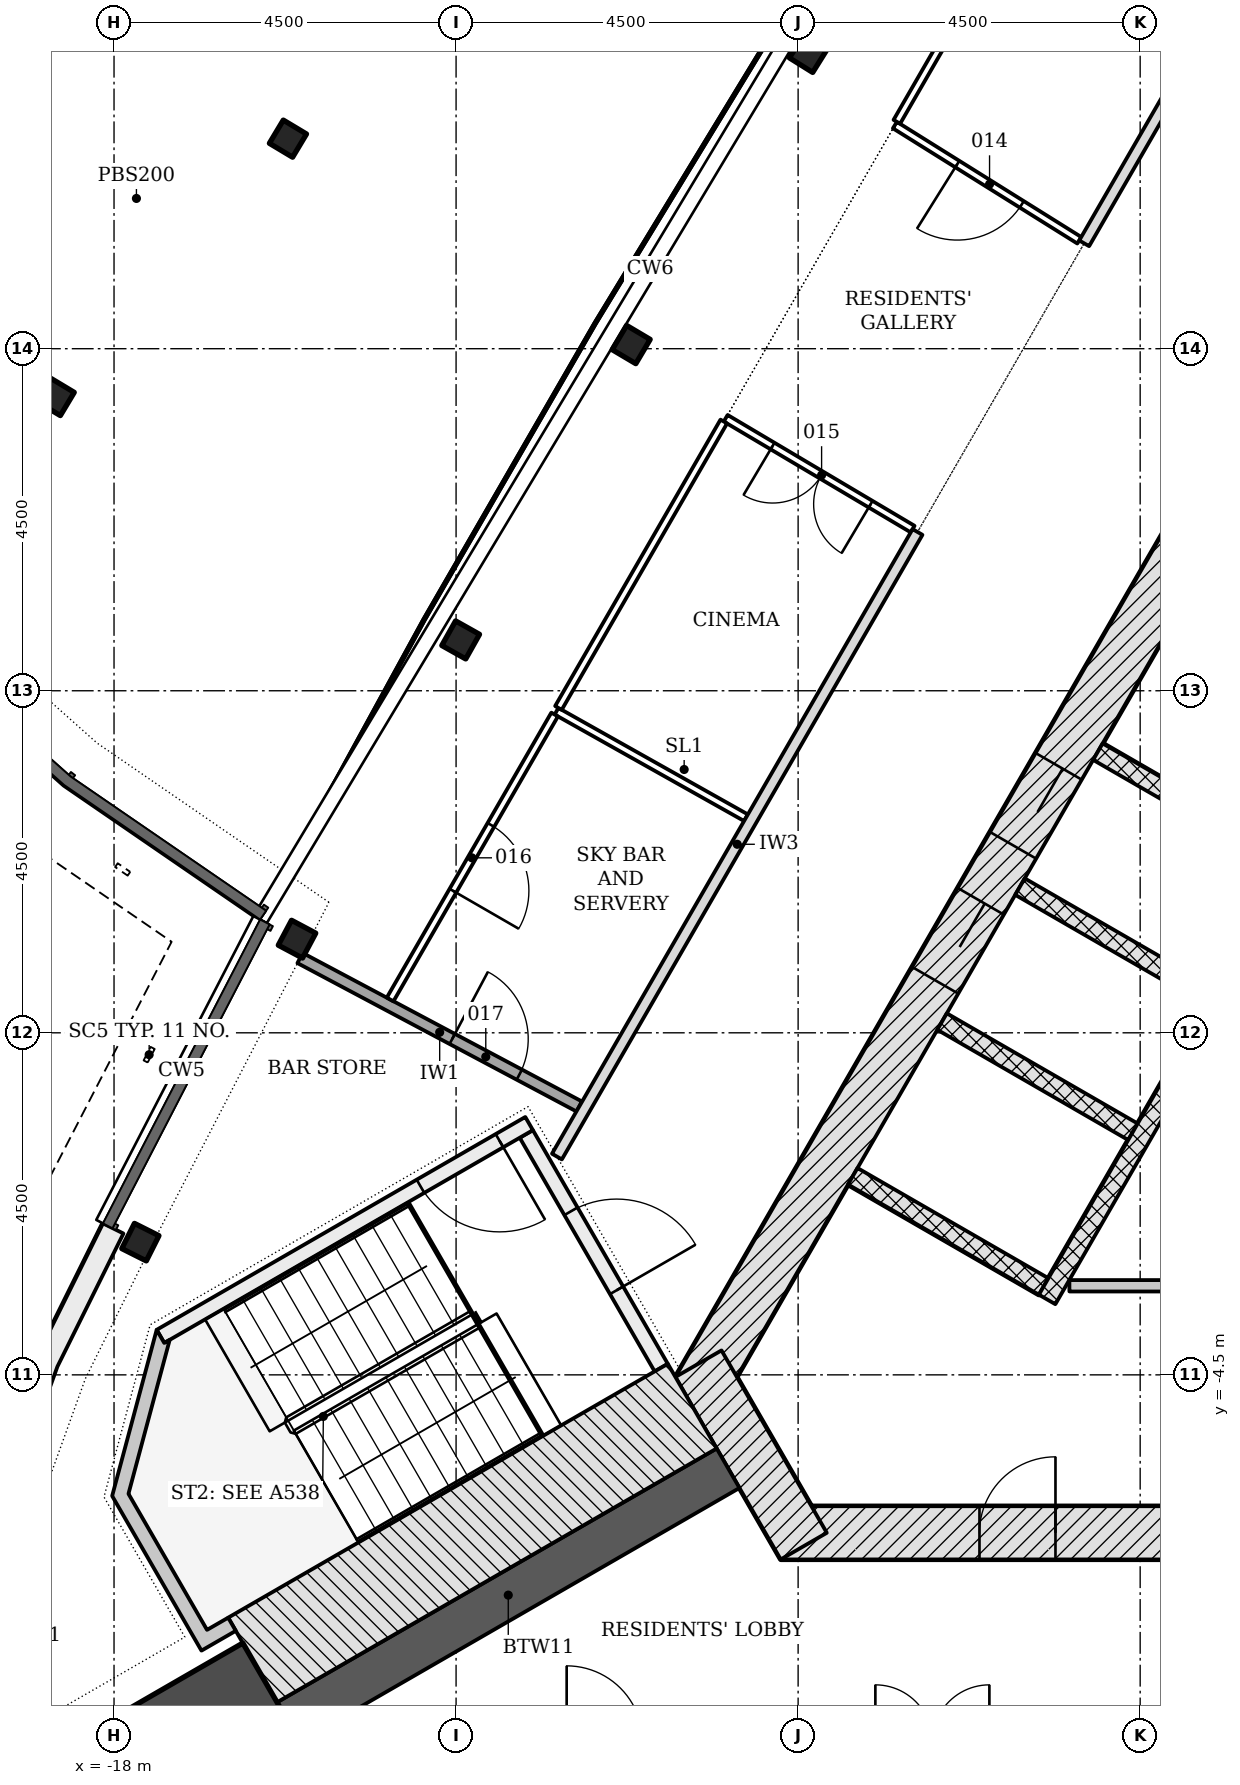
"""IFC4 building model, lengths in metres.
Left out: names, types, materials, properties, quantities, classifications, styles, units other than length and angle.
Written with IfcOpenShell. Run it as: python <this file> out.ifc"""

import sys

from ifc_helpers import new_model, si_unit, direction, frame, frame_2d, origin, origin_2d, place, context, subcontext, project, spatial, polyline, rectangle, hollow_rectangle, i_section, outline, extrude, element, fill, save


model = new_model("IFC4")
c1 = context("Model", 3, precision=1e-05, world=origin(), true_north=direction((0.0, 1.0)))
c2 = subcontext(c1, "Body", "Model", "MODEL_VIEW")
j1 = project(units=[si_unit("LENGTHUNIT", "METRE"), si_unit("PLANEANGLEUNIT", "RADIAN")], contexts=[c1])
p1 = place(None, origin())
s1 = spatial("IfcSite", under=j1, at=p1, CompositionType="ELEMENT")
p2 = place(p1, origin())
s2 = spatial("IfcBuilding", under=s1, at=p2, CompositionType="ELEMENT")
p3 = place(p2, frame((0.0, 0.0, 263.4)))
s3 = spatial("IfcBuildingStorey", under=s2, at=p3, CompositionType="ELEMENT", Elevation=263.4)
p4 = place(p3, frame((-9.229, -6.578, -0.2), z_axis=(0.0, 0.0, 1.0), x_axis=(1.0, 0.0, 0.0)))
e1 = element("IfcWall", 1, at=p4, inside=s3, PredefinedType="SHEAR", context=c2, shape_type="SweptSolid", body=[
    extrude(rectangle(XDim=18.458, YDim=0.7, at=frame_2d((9.229, 0.0))), origin(), (0.0, 0.0, 1.0), 3.6),
])
p5 = place(p4, frame((6.1, 0.0, 0.2)))
e2 = element("IfcOpeningElement", 2, at=p5, cuts=e1, PredefinedType="OPENING", context=c2, shape_type="SweptSolid", body=[
    extrude(rectangle(XDim=1.0, YDim=2.1, at=frame_2d((0.5, 1.05))), frame((0.0, 0.36, 0.0), z_axis=(0.0, -1.0, 0.0), x_axis=(1.0, 0.0, 0.0)), (0.0, 0.0, 1.0), 0.72),
])
p6 = place(p4, frame((2.615, 0.0, 0.2)))
e3 = element("IfcOpeningElement", 3, at=p6, cuts=e1, PredefinedType="OPENING", context=c2, shape_type="SweptSolid", body=[
    extrude(rectangle(XDim=1.0, YDim=2.1, at=frame_2d((0.5, 1.05))), frame((0.0, 0.36, 0.0), z_axis=(0.0, -1.0, 0.0), x_axis=(1.0, 0.0, 0.0)), (0.0, 0.0, 1.0), 0.72),
])
p7 = place(p4, frame((9.198, 0.0, 0.2)))
e4 = element("IfcOpeningElement", 4, at=p7, cuts=e1, PredefinedType="OPENING", context=c2, shape_type="SweptSolid", body=[
    extrude(rectangle(XDim=0.9, YDim=2.1, at=frame_2d((0.45, 1.05))), frame((0.0, 0.36, 0.0), z_axis=(0.0, -1.0, 0.0), x_axis=(1.0, 0.0, 0.0)), (0.0, 0.0, 1.0), 0.72),
])
p8 = place(p4, frame((13.877, 0.0, 0.2)))
e5 = element("IfcOpeningElement", 5, at=p8, cuts=e1, PredefinedType="OPENING", context=c2, shape_type="SweptSolid", body=[
    extrude(rectangle(XDim=0.9, YDim=2.1, at=frame_2d((0.45, 1.05))), frame((0.0, 0.36, 0.0), z_axis=(0.0, -1.0, 0.0), x_axis=(1.0, 0.0, 0.0)), (0.0, 0.0, 1.0), 0.72),
])
p9 = place(p3, frame((-1.083, 11.281, -0.2), z_axis=(0.0, 0.0, 1.0), x_axis=(-0.500001446645, -0.866024568562, 0.0)))
e6 = element("IfcWall", 6, at=p9, inside=s3, PredefinedType="SHEAR", context=c2, shape_type="SweptSolid", body=[
    extrude(rectangle(XDim=18.458, YDim=0.7, at=frame_2d((9.229, 0.0))), origin(), (0.0, 0.0, 1.0), 3.6),
])
p10 = place(p9, frame((8.979, 0.0, 0.2)))
e7 = element("IfcOpeningElement", 7, at=p10, cuts=e6, PredefinedType="OPENING", context=c2, shape_type="SweptSolid", body=[
    extrude(rectangle(XDim=1.2, YDim=2.1, at=frame_2d((0.6, 1.05))), frame((0.0, 0.36, 0.0), z_axis=(0.0, -1.0, 0.0), x_axis=(1.0, 0.0, 0.0)), (0.0, 0.0, 1.0), 0.72),
])
p11 = place(p9, frame((11.029, 0.0, 0.2)))
e8 = element("IfcOpeningElement", 8, at=p11, cuts=e6, PredefinedType="OPENING", context=c2, shape_type="SweptSolid", body=[
    extrude(rectangle(XDim=1.2, YDim=2.1, at=frame_2d((0.6, 1.05))), frame((0.0, 0.36, 0.0), z_axis=(0.0, -1.0, 0.0), x_axis=(1.0, 0.0, 0.0)), (0.0, 0.0, 1.0), 0.72),
])
p12 = place(p3, frame((-10.311, -4.353, -0.2), z_axis=(0.0, 0.0, 1.0), x_axis=(0.500042739161, -0.866000726912, 0.0)))
e9 = element("IfcWall", 9, at=p12, inside=s3, PredefinedType="SHEAR", context=c2, shape_type="SweptSolid", body=[
    extrude(rectangle(XDim=2.771, YDim=0.7, at=frame_2d((1.386, 0.0))), origin(), (0.0, 0.0, 1.0), 3.6),
])
p13 = place(p3, frame((-9.922, -5.728, -0.2), z_axis=(0.0, 0.0, 1.0), x_axis=(-0.866032176823, -0.499988268569, 0.0)))
e10 = element("IfcWall", 10, at=p13, inside=s3, PredefinedType="SHEAR", context=c2, shape_type="SweptSolid", body=[
    extrude(rectangle(XDim=6.678, YDim=0.6, at=frame_2d((3.339, 0.0))), origin(), (0.0, 0.0, 1.0), 3.6),
])
p14 = place(p3, frame((-16.745, -9.667, -0.2), z_axis=(0.0, 0.0, 1.0), x_axis=(-0.866025403784, -0.5, 0.0)))
e11 = element("IfcColumn", 11, at=p14, inside=s3, PredefinedType="COLUMN", context=c2, shape_type="SweptSolid", body=[
    extrude(rectangle(XDim=2.4, YDim=2.4, at=origin_2d()), origin(), (0.0, 0.0, 1.0), 3.6),
])
for number, where, z_axis, x_axis in (
    (12, (-8.863, 12.888, -0.2), (0.0, 0.0, 1.0), (-0.53, -0.848, 0.0)),
    (13, (-11.196, 9.055, -0.2), (0.0, 0.0, 1.0), (-0.51, -0.86, 0.0)),
    (14, (-13.44, 5.169, -0.2), (0.0, 0.0, 1.0), (-0.49, -0.872, 0.0)),
    (15, (-15.593, 1.232, -0.2), (0.0, 0.0, 1.0), (-0.47, -0.883, 0.0)),
    (16, (-17.654, -2.754, -0.2), (0.0, 0.0, 1.0), (-0.449, -0.894, 0.0)),
):
    element("IfcColumn", number, at=place(p3, frame(where, z_axis=z_axis, x_axis=x_axis)), inside=s3, PredefinedType="COLUMN", context=c2, shape_type="SweptSolid", body=[
        extrude(i_section(OverallWidth=0.371, OverallDepth=0.361, WebThickness=0.012, FlangeThickness=0.02, FilletRadius=0.015, at=origin_2d()), origin(), (0.0, 0.0, 1.0), 3.6),
    ])
for number, where, z_axis, x_axis in (
    (17, (-15.712, 11.763, -0.2), (0.0, 0.0, 1.0), (-0.858, 0.514, 0.0)),
    (18, (-18.768, 8.365, -0.2), (0.0, 0.0, 1.0), (-0.858, 0.514, 0.0)),
):
    element("IfcColumn", number, at=place(p3, frame(where, z_axis=z_axis, x_axis=x_axis)), inside=s3, PredefinedType="COLUMN", context=c2, shape_type="SweptSolid", body=[
        extrude(hollow_rectangle(XDim=0.356, YDim=0.356, WallThickness=0.013, at=origin_2d()), origin(), (0.0, 0.0, 1.0), 3.6),
    ])
p15 = place(p3, origin())
e19 = element("IfcWall", 19, at=p15, inside=s3, PredefinedType="NOTDEFINED", context=c2, shape_type="SweptSolid", body=[
    extrude(outline(polyline([(-18.145, -2.507), (-19.021, -4.273), (-19.538, -5.703), (-19.733, -7.21), (-19.599, -8.724), (-19.141, -10.174), (-18.381, -11.49), (-17.355, -12.611), (-16.111, -13.485), (-14.708, -14.069), (-13.211, -14.336), (-11.244, -14.46), (-11.225, -14.161), (-13.176, -14.038), (-14.623, -13.779), (-15.965, -13.22), (-17.156, -12.385), (-18.138, -11.312), (-18.865, -10.052), (-19.303, -8.665), (-19.432, -7.216), (-19.244, -5.774), (-18.745, -4.391), (-17.876, -2.64), (-18.145, -2.507)])), origin(), (0.0, 0.0, 1.0), 3.3),
])
for number, where, z_axis, x_axis in (
    (20, (-5.056, 3.699, -0.2), (0.0, 0.0, 1.0), (0.866, -0.5, 0.0)),
    (21, (-6.081, 1.923, -0.2), (0.0, 0.0, 1.0), (0.866, -0.5, 0.0)),
    (22, (-7.106, 0.148, -0.2), (0.0, 0.0, 1.0), (0.866, -0.5, 0.0)),
    (23, (-8.281, -1.887, -0.2), (0.0, 0.0, 1.0), (0.866, -0.5, 0.0)),
):
    element("IfcWall", number, at=place(p3, frame(where, z_axis=z_axis, x_axis=x_axis)), inside=s3, PredefinedType="PARTITIONING", context=c2, shape_type="SweptSolid", body=[
        extrude(rectangle(XDim=2.9, YDim=0.25, at=frame_2d((1.45, 0.0))), origin(), (0.0, 0.0, 1.0), 3.6),
    ])
p16 = place(p3, frame((-2.374, 2.294, 0.0), z_axis=(0.0, 0.0, 1.0), x_axis=(-0.500003174267, -0.866023571113, 0.0)))
e24 = element("IfcWall", 24, at=p16, inside=s3, PredefinedType="PARTITIONING", context=c2, shape_type="SweptSolid", body=[
    extrude(rectangle(XDim=6.7, YDim=0.25, at=frame_2d((3.35, 0.0))), origin(), (0.0, 0.0, 1.0), 3.4),
])
p17 = place(p3, frame((-5.431, -3.328, 0.0), z_axis=(0.0, 0.0, 1.0), x_axis=(1.0, 0.0, 0.0)))
e25 = element("IfcWall", 25, at=p17, inside=s3, PredefinedType="PARTITIONING", context=c2, shape_type="SweptSolid", body=[
    extrude(rectangle(XDim=1.952, YDim=0.15, at=frame_2d((0.976, 0.0))), origin(), (0.0, 0.0, 1.0), 3.4),
])
p18 = place(p3, frame((-12.576, -1.331, -0.2), z_axis=(0.0, 0.0, 1.0), x_axis=(0.499970499736, -0.8660424351, 0.0)))
e26 = element("IfcWall", 26, at=p18, inside=s3, PredefinedType="SHEAR", context=c2, shape_type="SweptSolid", body=[
    extrude(rectangle(XDim=3.55, YDim=0.2, at=frame_2d((1.775, 0.0))), origin(), (0.0, 0.0, 1.0), 3.6),
])
p19 = place(p18, frame((1.175, 0.0, 0.2)))
e27 = element("IfcOpeningElement", 27, at=p19, cuts=e26, PredefinedType="OPENING", context=c2, shape_type="SweptSolid", body=[
    extrude(rectangle(XDim=1.2, YDim=2.1, at=frame_2d((0.6, 1.05))), frame((0.0, 0.11, 0.0), z_axis=(0.0, -1.0, 0.0), x_axis=(1.0, 0.0, 0.0)), (0.0, 0.0, 1.0), 0.22),
])
p20 = place(p3, frame((-12.539, -1.194, -0.2), z_axis=(0.0, 0.0, 1.0), x_axis=(-0.866045472092, -0.499965239061, 0.0)))
e28 = element("IfcWall", 28, at=p20, inside=s3, PredefinedType="SHEAR", context=c2, shape_type="SweptSolid", body=[
    extrude(rectangle(XDim=5.6, YDim=0.2, at=frame_2d((2.8, 0.0))), origin(), (0.0, 0.0, 1.0), 3.6),
])
p21 = place(p20, frame((0.45, 0.0, 0.2)))
e29 = element("IfcOpeningElement", 29, at=p21, cuts=e28, PredefinedType="OPENING", context=c2, shape_type="SweptSolid", body=[
    extrude(rectangle(XDim=1.2, YDim=2.1, at=frame_2d((0.6, 1.05))), frame((0.0, 0.11, 0.0), z_axis=(0.0, -1.0, 0.0), x_axis=(1.0, 0.0, 0.0)), (0.0, 0.0, 1.0), 0.22),
])
p22 = place(p3, frame((-10.393, -4.912, -0.2), z_axis=(0.0, 0.0, 1.0), x_axis=(-0.866025486527, -0.499999856685, 0.0)))
e30 = element("IfcWall", 30, at=p22, inside=s3, PredefinedType="SHEAR", context=c2, shape_type="SweptSolid", body=[
    extrude(rectangle(XDim=6.679, YDim=1.286, at=frame_2d((3.339, 0.0))), origin(), (0.0, 0.0, 1.0), 3.6),
])
p23 = place(p3, frame((0.0, 0.0, -0.2)))
e31 = element("IfcWall", 31, at=p23, inside=s3, PredefinedType="SHEAR", context=c2, shape_type="SweptSolid", body=[
    extrude(outline(polyline([(-17.439, -3.907), (-18.025, -6.093), (-16.85, -8.128), (-16.398, -7.867), (-16.498, -7.694), (-16.498, -7.694), (-16.777, -7.855), (-17.81, -6.065), (-17.267, -4.039), (-17.339, -4.081), (-17.339, -4.081), (-17.339, -4.081), (-17.339, -4.081), (-17.339, -4.081), (-17.339, -4.081), (-17.339, -4.081), (-17.339, -4.081), (-17.339, -4.081), (-17.339, -4.081), (-17.339, -4.081), (-17.339, -4.081), (-17.339, -4.081), (-17.339, -4.081), (-17.339, -4.081), (-17.339, -4.081), (-17.339, -4.081), (-17.439, -3.907)])), origin(), (0.0, 0.0, 1.0), 3.6),
])
p24 = place(p3, frame((-0.723, 18.205, 0.0), z_axis=(0.0, 0.0, 1.0), x_axis=(-0.500010391421, -0.866019404212, 0.0)))
e32 = element("IfcWall", 32, at=p24, inside=s3, PredefinedType="PARTITIONING", context=c2, shape_type="SweptSolid", body=[
    extrude(rectangle(XDim=9.028, YDim=0.15, at=frame_2d((4.514, 0.0))), origin(), (0.0, 0.0, 1.0), 2.852),
])
p25 = place(p3, frame((-7.429, 6.589, 0.0), z_axis=(0.0, 0.0, 1.0), x_axis=(-0.499994197604, -0.866028753773, 0.0)))
e33 = element("IfcWall", 33, at=p25, inside=s3, PredefinedType="PARTITIONING", context=c2, shape_type="SweptSolid", body=[
    extrude(rectangle(XDim=9.488, YDim=0.15, at=frame_2d((4.744, 0.0))), origin(), (0.0, 0.0, 1.0), 2.852),
])
p26 = place(p3, frame((-15.552, 0.984, 0.0), z_axis=(0.0, 0.0, 1.0), x_axis=(0.882898276856, -0.469564300947, 0.0)))
e34 = element("IfcWall", 34, at=p26, inside=s3, PredefinedType="PARTITIONING", context=c2, shape_type="SweptSolid", body=[
    extrude(rectangle(XDim=4.159, YDim=0.15, at=frame_2d((2.08, 0.0))), origin(), (0.0, 0.0, 1.0), 3.4),
])
p27 = place(p26, frame((2.267, 0.0, 0.0)))
e35 = element("IfcOpeningElement", 35, at=p27, cuts=e34, PredefinedType="OPENING", context=c2, shape_type="SweptSolid", body=[
    extrude(rectangle(XDim=1.0, YDim=2.1, at=frame_2d((0.5, 1.05))), frame((0.0, 0.085, 0.0), z_axis=(0.0, -1.0, 0.0), x_axis=(1.0, 0.0, 0.0)), (0.0, 0.0, 1.0), 0.17),
])
p28 = place(p3, frame((-5.3, 10.426, 0.0), z_axis=(0.0, 0.0, 1.0), x_axis=(-0.84806062783, 0.529899208835, 0.0)))
e36 = element("IfcWall", 36, at=p28, inside=s3, PredefinedType="PARTITIONING", context=c2, shape_type="SweptSolid", body=[
    extrude(rectangle(XDim=2.861, YDim=0.1, at=frame_2d((1.43, 0.0))), origin(), (0.0, 0.0, 1.0), 3.4),
])
p29 = place(p28, frame((0.893, 0.0, 0.0)))
e37 = element("IfcOpeningElement", 37, at=p29, cuts=e36, PredefinedType="OPENING", context=c2, shape_type="SweptSolid", body=[
    extrude(rectangle(XDim=1.0, YDim=2.1, at=frame_2d((0.5, 1.05))), frame((0.0, 0.06, 0.0), z_axis=(0.0, -1.0, 0.0), x_axis=(1.0, 0.0, 0.0)), (0.0, 0.0, 1.0), 0.12),
])
p30 = place(p3, frame((-7.494, 6.627, 0.0), z_axis=(0.0, 0.0, 1.0), x_axis=(-0.860170843297, 0.510006000299, 0.0)))
e38 = element("IfcWall", 38, at=p30, inside=s3, PredefinedType="PARTITIONING", context=c2, shape_type="SweptSolid", body=[
    extrude(rectangle(XDim=2.859, YDim=0.1, at=frame_2d((1.43, 0.0))), origin(), (0.0, 0.0, 1.0), 3.4),
])
p31 = place(p30, frame((0.642, 0.0, 0.0)))
e39 = element("IfcOpeningElement", 39, at=p31, cuts=e38, PredefinedType="OPENING", context=c2, shape_type="SweptSolid", body=[
    extrude(rectangle(XDim=1.5, YDim=2.1, at=frame_2d((0.75, 1.05))), frame((0.0, 0.06, 0.0), z_axis=(0.0, -1.0, 0.0), x_axis=(1.0, 0.0, 0.0)), (0.0, 0.0, 1.0), 0.12),
])
p32 = place(p3, frame((-9.686, 2.83, 0.0), z_axis=(0.0, 0.0, 1.0), x_axis=(-0.871778429479, 0.489900367315, 0.0)))
e40 = element("IfcWall", 40, at=p32, inside=s3, PredefinedType="PARTITIONING", context=c2, shape_type="SweptSolid", body=[
    extrude(rectangle(XDim=2.859, YDim=0.1, at=frame_2d((1.43, 0.0))), origin(), (0.0, 0.0, 1.0), 3.4),
])
p33 = place(p3, frame((-2.586, 20.846, 0.0), z_axis=(0.0, 0.0, 1.0), x_axis=(-0.499993724355, -0.866029026999, 0.0)))
e41 = element("IfcWall", 41, at=p33, inside=s3, PredefinedType="PARTITIONING", context=c2, shape_type="SweptSolid", body=[
    extrude(rectangle(XDim=10.232, YDim=0.1, at=frame_2d((5.116, 0.0))), origin(), (0.0, 0.0, 1.0), 2.852),
])
p34 = place(p3, frame((-9.978, 8.042, 0.0), z_axis=(0.0, 0.0, 1.0), x_axis=(-0.500007404367, -0.866021128829, 0.0)))
e42 = element("IfcWall", 42, at=p34, inside=s3, PredefinedType="PARTITIONING", context=c2, shape_type="SweptSolid", body=[
    extrude(rectangle(XDim=4.351, YDim=0.1, at=frame_2d((2.176, 0.0))), origin(), (0.0, 0.0, 1.0), 2.852),
])
p35 = place(p3, frame((-12.204, 4.187, 0.0), z_axis=(0.0, 0.0, 1.0), x_axis=(-0.499973093216, -0.866040937866, 0.0)))
e43 = element("IfcWall", 43, at=p35, inside=s3, PredefinedType="PARTITIONING", context=c2, shape_type="SweptSolid", body=[
    extrude(rectangle(XDim=4.328, YDim=0.1, at=frame_2d((2.164, 0.0))), origin(), (0.0, 0.0, 1.0), 2.852),
])
p36 = place(p35, frame((1.677, 0.0, 0.0)))
e44 = element("IfcOpeningElement", 44, at=p36, cuts=e43, PredefinedType="OPENING", context=c2, shape_type="SweptSolid", body=[
    extrude(rectangle(XDim=1.0, YDim=2.1, at=frame_2d((0.5, 1.05))), frame((0.0, 0.06, 0.0), z_axis=(0.0, -1.0, 0.0), x_axis=(1.0, 0.0, 0.0)), (0.0, 0.0, 1.0), 0.12),
])
p37 = place(p10, origin())
e45 = element("IfcDoor", 45, at=p37, inside=s3, OperationType="DOUBLE_DOOR_SLIDING", PredefinedType="DOOR", context=c2, shape_type="SweptSolid", body=[
    extrude(rectangle(XDim=1.2, YDim=2.1, at=frame_2d((0.6, 1.05))), frame((0.0, 0.025, 0.0), z_axis=(0.0, -1.0, 0.0), x_axis=(1.0, 0.0, 0.0)), (0.0, 0.0, 1.0), 0.05),
])
fill(e7, e45)
p38 = place(p11, origin())
e46 = element("IfcDoor", 46, at=p38, inside=s3, OperationType="DOUBLE_DOOR_SLIDING", PredefinedType="DOOR", context=c2, shape_type="SweptSolid", body=[
    extrude(rectangle(XDim=1.2, YDim=2.1, at=frame_2d((0.6, 1.05))), frame((0.0, 0.025, 0.0), z_axis=(0.0, -1.0, 0.0), x_axis=(1.0, 0.0, 0.0)), (0.0, 0.0, 1.0), 0.05),
])
fill(e8, e46)
p39 = place(p6, origin())
e47 = element("IfcDoor", 47, at=p39, inside=s3, OperationType="SINGLE_SWING_RIGHT", PredefinedType="DOOR", context=c2, shape_type="SweptSolid", body=[
    extrude(rectangle(XDim=1.0, YDim=2.1, at=frame_2d((0.5, 1.05))), frame((0.0, 0.075, 0.0), z_axis=(0.0, -1.0, 0.0), x_axis=(1.0, 0.0, 0.0)), (0.0, 0.0, 1.0), 0.15),
])
fill(e3, e47)
p40 = place(p19, origin())
e48 = element("IfcDoor", 48, at=p40, inside=s3, OperationType="SINGLE_SWING_RIGHT", PredefinedType="DOOR", context=c2, shape_type="SweptSolid", body=[
    extrude(rectangle(XDim=1.2, YDim=2.1, at=frame_2d((0.6, 1.05))), frame((0.0, 0.025, 0.0), z_axis=(0.0, -1.0, 0.0), x_axis=(1.0, 0.0, 0.0)), (0.0, 0.0, 1.0), 0.05),
])
fill(e27, e48)
p41 = place(p21, origin())
e49 = element("IfcDoor", 49, at=p41, inside=s3, OperationType="SINGLE_SWING_LEFT", PredefinedType="DOOR", context=c2, shape_type="SweptSolid", body=[
    extrude(rectangle(XDim=1.2, YDim=2.1, at=frame_2d((0.6, 1.05))), frame((0.0, 0.025, 0.0), z_axis=(0.0, -1.0, 0.0), x_axis=(1.0, 0.0, 0.0)), (0.0, 0.0, 1.0), 0.05),
])
fill(e29, e49)
p42 = place(p29, origin())
e50 = element("IfcDoor", 50, at=p42, inside=s3, OperationType="SINGLE_SWING_RIGHT", PredefinedType="DOOR", context=c2, shape_type="SweptSolid", body=[
    extrude(rectangle(XDim=1.0, YDim=2.1, at=frame_2d((0.5, 1.05))), frame((0.0, 0.025, 0.0), z_axis=(0.0, -1.0, 0.0), x_axis=(1.0, 0.0, 0.0)), (0.0, 0.0, 1.0), 0.05),
])
fill(e37, e50)
p43 = place(p31, origin())
e51 = element("IfcDoor", 51, at=p43, inside=s3, OperationType="DOUBLE_DOOR_SINGLE_SWING", PredefinedType="DOOR", context=c2, shape_type="SweptSolid", body=[
    extrude(rectangle(XDim=1.5, YDim=2.1, at=frame_2d((0.75, 1.05))), frame((0.0, 0.025, 0.0), z_axis=(0.0, -1.0, 0.0), x_axis=(1.0, 0.0, 0.0)), (0.0, 0.0, 1.0), 0.05),
])
fill(e39, e51)
p44 = place(p36, origin())
e52 = element("IfcDoor", 52, at=p44, inside=s3, OperationType="SINGLE_SWING_RIGHT", PredefinedType="DOOR", context=c2, shape_type="SweptSolid", body=[
    extrude(rectangle(XDim=1.0, YDim=2.1, at=frame_2d((0.5, 1.05))), frame((0.0, 0.025, 0.0), z_axis=(0.0, -1.0, 0.0), x_axis=(1.0, 0.0, 0.0)), (0.0, 0.0, 1.0), 0.05),
])
fill(e44, e52)
p45 = place(p27, origin())
e53 = element("IfcDoor", 53, at=p45, inside=s3, OperationType="SINGLE_SWING_LEFT", PredefinedType="DOOR", context=c2, shape_type="SweptSolid", body=[
    extrude(rectangle(XDim=1.0, YDim=2.1, at=frame_2d((0.5, 1.05))), frame((0.0, 0.025, 0.0), z_axis=(0.0, -1.0, 0.0), x_axis=(1.0, 0.0, 0.0)), (0.0, 0.0, 1.0), 0.05),
])
fill(e35, e53)
save(model, sys.argv[1])
